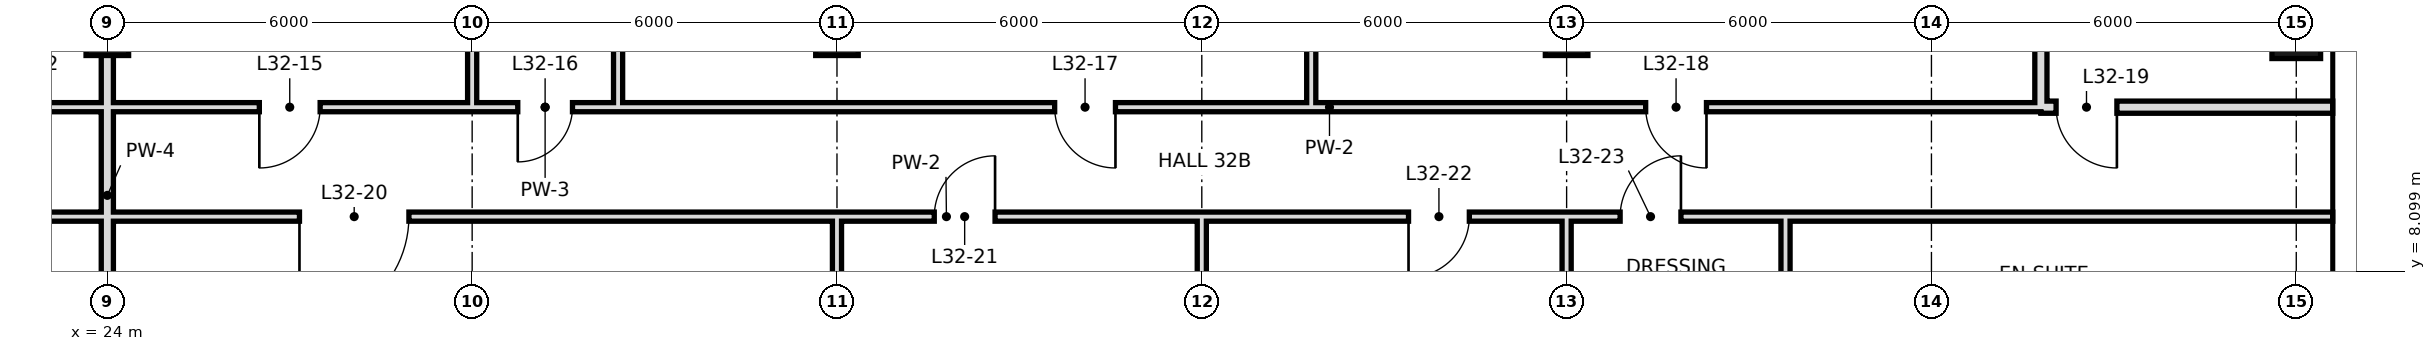
"""IFC4 building model, lengths in metres.
Left out: names, types, materials, properties, quantities, classifications, styles, units other than length and angle.
Written with IfcOpenShell. Run it as: python <this file> out.ifc"""

import sys

from ifc_helpers import new_model, si_unit, direction, frame, frame_2d, origin, origin_2d, place, context, subcontext, project, spatial, rectangle, hollow_rectangle, extrude, element, fill, save


model = new_model("IFC4")
c1 = context("Model", 3, precision=1e-05, world=origin(), true_north=direction((0.0, 1.0)))
c2 = subcontext(c1, "Body", "Model", "MODEL_VIEW")
j1 = project(units=[si_unit("LENGTHUNIT", "METRE"), si_unit("PLANEANGLEUNIT", "RADIAN")], contexts=[c1])
p1 = place(None, origin())
s1 = spatial("IfcSite", under=j1, at=p1, CompositionType="ELEMENT")
p2 = place(p1, origin())
s2 = spatial("IfcBuilding", under=s1, at=p2, CompositionType="ELEMENT")
p3 = place(p2, frame((0.0, 0.0, 143.8)))
s3 = spatial("IfcBuildingStorey", under=s2, at=p3, CompositionType="ELEMENT", Elevation=143.8)
for number, where, z_axis, x_axis in (
    (1, (24.0, 12.0, 0.0), (0.0, 0.0, 1.0), (1.0, 0.0, 0.0)),
    (2, (36.0, 12.0, 0.0), (0.0, 0.0, 1.0), (1.0, 0.0, 0.0)),
    (3, (48.0, 12.0, 0.0), (0.0, 0.0, 1.0), (1.0, 0.0, 0.0)),
):
    element("IfcColumn", number, at=place(p3, frame(where, z_axis=z_axis, x_axis=x_axis)), inside=s3, PredefinedType="COLUMN", context=c2, shape_type="SweptSolid", body=[
        extrude(hollow_rectangle(XDim=0.7, YDim=0.7, WallThickness=0.036, at=origin_2d()), origin(), (0.0, 0.0, 1.0), 3.6),
    ])
p4 = place(p3, frame((60.0, 12.0, 0.0), z_axis=(0.0, 0.0, 1.0), x_axis=(1.0, 0.0, 0.0)))
e4 = element("IfcColumn", 4, at=p4, inside=s3, PredefinedType="COLUMN", context=c2, shape_type="SweptSolid", body=[
    extrude(hollow_rectangle(XDim=0.8, YDim=0.8, WallThickness=0.04, at=origin_2d()), origin(), (0.0, 0.0, 1.0), 3.6),
])
p5 = place(p3, frame((24.0, 0.0, 0.0), z_axis=(0.0, 0.0, 1.0), x_axis=(0.0, 1.0, 0.0)))
e5 = element("IfcWall", 5, at=p5, inside=s3, PredefinedType="SOLIDWALL", context=c2, shape_type="SweptSolid", body=[
    extrude(rectangle(XDim=18.7, YDim=0.2, at=frame_2d((9.35, 0.0))), origin(), (0.0, 0.0, 1.0), 2.72),
])
p6 = place(p3, frame((30.0, 10.8, 0.0), z_axis=(0.0, 0.0, 1.0), x_axis=(0.0, 1.0, 0.0)))
e6 = element("IfcWall", 6, at=p6, inside=s3, PredefinedType="PARTITIONING", context=c2, shape_type="SweptSolid", body=[
    extrude(rectangle(XDim=7.9, YDim=0.15, at=frame_2d((3.95, 0.0))), origin(), (0.0, 0.0, 1.0), 2.72),
])
p7 = place(p3, frame((32.4, 10.8, 0.0), z_axis=(0.0, 0.0, 1.0), x_axis=(0.0, 1.0, 0.0)))
e7 = element("IfcWall", 7, at=p7, inside=s3, PredefinedType="PARTITIONING", context=c2, shape_type="SweptSolid", body=[
    extrude(rectangle(XDim=7.9, YDim=0.15, at=frame_2d((3.95, 0.0))), origin(), (0.0, 0.0, 1.0), 3.42),
])
p8 = place(p3, frame((36.0, 0.0, 0.0), z_axis=(0.0, 0.0, 1.0), x_axis=(0.0, 1.0, 0.0)))
e8 = element("IfcWall", 8, at=p8, inside=s3, PredefinedType="PARTITIONING", context=c2, shape_type="SweptSolid", body=[
    extrude(rectangle(XDim=9.0, YDim=0.15, at=frame_2d((4.5, 0.0))), origin(), (0.0, 0.0, 1.0), 2.72),
])
p9 = place(p3, frame((42.0, -0.6, 0.0), z_axis=(0.0, 0.0, 1.0), x_axis=(0.0, 1.0, 0.0)))
e9 = element("IfcWall", 9, at=p9, inside=s3, PredefinedType="PARTITIONING", context=c2, shape_type="SweptSolid", body=[
    extrude(rectangle(XDim=9.6, YDim=0.15, at=frame_2d((4.8, 0.0))), origin(), (0.0, 0.0, 1.0), 2.72),
])
p10 = place(p3, frame((43.8, 10.8, 0.0), z_axis=(0.0, 0.0, 1.0), x_axis=(0.0, 1.0, 0.0)))
e10 = element("IfcWall", 10, at=p10, inside=s3, PredefinedType="PARTITIONING", context=c2, shape_type="SweptSolid", body=[
    extrude(rectangle(XDim=7.9, YDim=0.15, at=frame_2d((3.95, 0.0))), origin(), (0.0, 0.0, 1.0), 3.42),
])
p11 = place(p3, frame((48.0, 0.0, 0.0), z_axis=(0.0, 0.0, 1.0), x_axis=(0.0, 1.0, 0.0)))
e11 = element("IfcWall", 11, at=p11, inside=s3, PredefinedType="PARTITIONING", context=c2, shape_type="SweptSolid", body=[
    extrude(rectangle(XDim=9.0, YDim=0.15, at=frame_2d((4.5, 0.0))), origin(), (0.0, 0.0, 1.0), 2.72),
])
p12 = place(p3, frame((51.6, 6.0, 0.0), z_axis=(0.0, 0.0, 1.0), x_axis=(0.0, 1.0, 0.0)))
e12 = element("IfcWall", 12, at=p12, inside=s3, PredefinedType="PARTITIONING", context=c2, shape_type="SweptSolid", body=[
    extrude(rectangle(XDim=3.0, YDim=0.15, at=frame_2d((1.5, 0.0))), origin(), (0.0, 0.0, 1.0), 3.42),
])
p13 = place(p3, frame((55.8, 10.8, 0.0), z_axis=(0.0, 0.0, 1.0), x_axis=(0.0, 1.0, 0.0)))
e13 = element("IfcWall", 13, at=p13, inside=s3, PredefinedType="SOLIDWALL", context=c2, shape_type="SweptSolid", body=[
    extrude(rectangle(XDim=7.2, YDim=0.2, at=frame_2d((3.6, 0.0))), origin(), (0.0, 0.0, 1.0), 2.72),
])
p14 = place(p3, frame((55.8, 10.8, 0.0), z_axis=(0.0, 0.0, 1.0), x_axis=(1.0, 0.0, 0.0)))
e14 = element("IfcWall", 14, at=p14, inside=s3, PredefinedType="SOLIDWALL", context=c2, shape_type="SweptSolid", body=[
    extrude(rectangle(XDim=4.8, YDim=0.2, at=frame_2d((2.4, 0.0))), origin(), (0.0, 0.0, 1.0), 2.97),
])
p15 = place(p14, frame((0.25, 0.0, 0.0)))
e15 = element("IfcOpeningElement", 15, at=p15, cuts=e14, PredefinedType="OPENING", context=c2, shape_type="SweptSolid", body=[
    extrude(rectangle(XDim=1.0, YDim=2.4, at=frame_2d((0.5, 1.2))), frame((0.0, 0.11, 0.0), z_axis=(0.0, -1.0, 0.0), x_axis=(1.0, 0.0, 0.0)), (0.0, 0.0, 1.0), 0.22),
])
p16 = place(p3, frame((15.6, 10.8, 0.0), z_axis=(0.0, 0.0, 1.0), x_axis=(1.0, 0.0, 0.0)))
e16 = element("IfcWall", 16, at=p16, inside=s3, PredefinedType="PARTITIONING", context=c2, shape_type="SweptSolid", body=[
    extrude(rectangle(XDim=14.4, YDim=0.15, at=frame_2d((7.2, 0.0))), origin(), (0.0, 0.0, 1.0), 3.42),
])
p17 = place(p16, frame((5.08, 0.0, 0.0)))
e17 = element("IfcOpeningElement", 17, at=p17, cuts=e16, PredefinedType="OPENING", context=c2, shape_type="SweptSolid", body=[
    extrude(rectangle(XDim=1.0, YDim=2.4, at=frame_2d((0.5, 1.2))), frame((0.0, 0.085, 0.0), z_axis=(0.0, -1.0, 0.0), x_axis=(1.0, 0.0, 0.0)), (0.0, 0.0, 1.0), 0.17),
])
p18 = place(p16, frame((10.9, 0.0, 0.0)))
e18 = element("IfcOpeningElement", 18, at=p18, cuts=e16, PredefinedType="OPENING", context=c2, shape_type="SweptSolid", body=[
    extrude(rectangle(XDim=1.0, YDim=2.4, at=frame_2d((0.5, 1.2))), frame((0.0, 0.085, 0.0), z_axis=(0.0, -1.0, 0.0), x_axis=(1.0, 0.0, 0.0)), (0.0, 0.0, 1.0), 0.17),
])
p19 = place(p3, frame((32.4, 10.8, 0.0), z_axis=(0.0, 0.0, 1.0), x_axis=(1.0, 0.0, 0.0)))
e19 = element("IfcWall", 19, at=p19, inside=s3, PredefinedType="PARTITIONING", context=c2, shape_type="SweptSolid", body=[
    extrude(rectangle(XDim=23.4, YDim=0.15, at=frame_2d((11.7, 0.0))), origin(), (0.0, 0.0, 1.0), 3.42),
])
p20 = place(p19, frame((7.18, 0.0, 0.0)))
e20 = element("IfcOpeningElement", 20, at=p20, cuts=e19, PredefinedType="OPENING", context=c2, shape_type="SweptSolid", body=[
    extrude(rectangle(XDim=1.0, YDim=2.4, at=frame_2d((0.5, 1.2))), frame((0.0, 0.085, 0.0), z_axis=(0.0, -1.0, 0.0), x_axis=(1.0, 0.0, 0.0)), (0.0, 0.0, 1.0), 0.17),
])
p21 = place(p19, frame((16.9, 0.0, 0.0)))
e21 = element("IfcOpeningElement", 21, at=p21, cuts=e19, PredefinedType="OPENING", context=c2, shape_type="SweptSolid", body=[
    extrude(rectangle(XDim=1.0, YDim=2.4, at=frame_2d((0.5, 1.2))), frame((0.0, 0.085, 0.0), z_axis=(0.0, -1.0, 0.0), x_axis=(1.0, 0.0, 0.0)), (0.0, 0.0, 1.0), 0.17),
])
p22 = place(p3, frame((30.0, 10.8, 0.0), z_axis=(0.0, 0.0, 1.0), x_axis=(1.0, 0.0, 0.0)))
e22 = element("IfcWall", 22, at=p22, inside=s3, PredefinedType="PARTITIONING", context=c2, shape_type="SweptSolid", body=[
    extrude(rectangle(XDim=2.4, YDim=0.15, at=frame_2d((1.2, 0.0))), origin(), (0.0, 0.0, 1.0), 3.42),
])
p23 = place(p22, frame((0.75, 0.0, 0.0)))
e23 = element("IfcOpeningElement", 23, at=p23, cuts=e22, PredefinedType="OPENING", context=c2, shape_type="SweptSolid", body=[
    extrude(rectangle(XDim=0.9, YDim=2.4, at=frame_2d((0.45, 1.2))), frame((0.0, 0.085, 0.0), z_axis=(0.0, -1.0, 0.0), x_axis=(1.0, 0.0, 0.0)), (0.0, 0.0, 1.0), 0.17),
])
p24 = place(p3, frame((24.0, 9.0, 0.0), z_axis=(0.0, 0.0, 1.0), x_axis=(1.0, 0.0, 0.0)))
e24 = element("IfcWall", 24, at=p24, inside=s3, PredefinedType="PARTITIONING", context=c2, shape_type="SweptSolid", body=[
    extrude(rectangle(XDim=27.6, YDim=0.15, at=frame_2d((13.8, 0.0))), origin(), (0.0, 0.0, 1.0), 3.42),
])
p25 = place(p24, frame((3.16, 0.0, 0.0)))
e25 = element("IfcOpeningElement", 25, at=p25, cuts=e24, PredefinedType="OPENING", context=c2, shape_type="SweptSolid", body=[
    extrude(rectangle(XDim=1.8, YDim=2.4, at=frame_2d((0.9, 1.2))), frame((0.0, 0.085, 0.0), z_axis=(0.0, -1.0, 0.0), x_axis=(1.0, 0.0, 0.0)), (0.0, 0.0, 1.0), 0.17),
])
p26 = place(p24, frame((13.6, 0.0, 0.0)))
e26 = element("IfcOpeningElement", 26, at=p26, cuts=e24, PredefinedType="OPENING", context=c2, shape_type="SweptSolid", body=[
    extrude(rectangle(XDim=1.0, YDim=2.4, at=frame_2d((0.5, 1.2))), frame((0.0, 0.085, 0.0), z_axis=(0.0, -1.0, 0.0), x_axis=(1.0, 0.0, 0.0)), (0.0, 0.0, 1.0), 0.17),
])
p27 = place(p24, frame((21.4, 0.0, 0.0)))
e27 = element("IfcOpeningElement", 27, at=p27, cuts=e24, PredefinedType="OPENING", context=c2, shape_type="SweptSolid", body=[
    extrude(rectangle(XDim=1.0, YDim=2.4, at=frame_2d((0.5, 1.2))), frame((0.0, 0.085, 0.0), z_axis=(0.0, -1.0, 0.0), x_axis=(1.0, 0.0, 0.0)), (0.0, 0.0, 1.0), 0.17),
])
p28 = place(p24, frame((24.88, 0.0, 0.0)))
e28 = element("IfcOpeningElement", 28, at=p28, cuts=e24, PredefinedType="OPENING", context=c2, shape_type="SweptSolid", body=[
    extrude(rectangle(XDim=1.0, YDim=2.4, at=frame_2d((0.5, 1.2))), frame((0.0, 0.085, 0.0), z_axis=(0.0, -1.0, 0.0), x_axis=(1.0, 0.0, 0.0)), (0.0, 0.0, 1.0), 0.17),
])
p29 = place(p3, frame((21.6, 9.0, 0.0), z_axis=(0.0, 0.0, 1.0), x_axis=(1.0, 0.0, 0.0)))
e29 = element("IfcWall", 29, at=p29, inside=s3, PredefinedType="PARTITIONING", context=c2, shape_type="SweptSolid", body=[
    extrude(rectangle(XDim=2.4, YDim=0.15, at=frame_2d((1.2, 0.0))), origin(), (0.0, 0.0, 1.0), 3.42),
])
p30 = place(p3, frame((51.6, 9.0, 0.0), z_axis=(0.0, 0.0, 1.0), x_axis=(1.0, 0.0, 0.0)))
e30 = element("IfcWall", 30, at=p30, inside=s3, PredefinedType="PARTITIONING", context=c2, shape_type="SweptSolid", body=[
    extrude(rectangle(XDim=9.0, YDim=0.15, at=frame_2d((4.5, 0.0))), origin(), (0.0, 0.0, 1.0), 3.42),
])
p31 = place(p18, frame((1.0, 0.0, 0.0), z_axis=(0.0, 0.0, 1.0), x_axis=(-1.0, 0.0, 0.0)))
e31 = element("IfcDoor", 31, at=p31, inside=s3, OperationType="SINGLE_SWING_RIGHT", PredefinedType="DOOR", context=c2, shape_type="SweptSolid", body=[
    extrude(rectangle(XDim=1.0, YDim=2.4, at=frame_2d((0.5, 1.2))), frame((0.0, 0.025, 0.0), z_axis=(0.0, -1.0, 0.0), x_axis=(1.0, 0.0, 0.0)), (0.0, 0.0, 1.0), 0.05),
])
fill(e18, e31)
p32 = place(p23, frame((0.9, 0.0, 0.0), z_axis=(0.0, 0.0, 1.0), x_axis=(-1.0, 0.0, 0.0)))
e32 = element("IfcDoor", 32, at=p32, inside=s3, OperationType="SINGLE_SWING_RIGHT", PredefinedType="DOOR", context=c2, shape_type="SweptSolid", body=[
    extrude(rectangle(XDim=0.9, YDim=2.4, at=frame_2d((0.45, 1.2))), frame((0.0, 0.025, 0.0), z_axis=(0.0, -1.0, 0.0), x_axis=(1.0, 0.0, 0.0)), (0.0, 0.0, 1.0), 0.05),
])
fill(e23, e32)
p33 = place(p20, origin())
e33 = element("IfcDoor", 33, at=p33, inside=s3, OperationType="SINGLE_SWING_RIGHT", PredefinedType="DOOR", context=c2, shape_type="SweptSolid", body=[
    extrude(rectangle(XDim=1.0, YDim=2.4, at=frame_2d((0.5, 1.2))), frame((0.0, 0.025, 0.0), z_axis=(0.0, -1.0, 0.0), x_axis=(1.0, 0.0, 0.0)), (0.0, 0.0, 1.0), 0.05),
])
fill(e20, e33)
p34 = place(p21, origin())
e34 = element("IfcDoor", 34, at=p34, inside=s3, OperationType="SINGLE_SWING_RIGHT", PredefinedType="DOOR", context=c2, shape_type="SweptSolid", body=[
    extrude(rectangle(XDim=1.0, YDim=2.4, at=frame_2d((0.5, 1.2))), frame((0.0, 0.025, 0.0), z_axis=(0.0, -1.0, 0.0), x_axis=(1.0, 0.0, 0.0)), (0.0, 0.0, 1.0), 0.05),
])
fill(e21, e34)
p35 = place(p15, origin())
e35 = element("IfcDoor", 35, at=p35, inside=s3, OperationType="SINGLE_SWING_RIGHT", PredefinedType="DOOR", context=c2, shape_type="SweptSolid", body=[
    extrude(rectangle(XDim=1.0, YDim=2.4, at=frame_2d((0.5, 1.2))), frame((0.0, 0.025, 0.0), z_axis=(0.0, -1.0, 0.0), x_axis=(1.0, 0.0, 0.0)), (0.0, 0.0, 1.0), 0.05),
])
fill(e15, e35)
p36 = place(p25, frame((1.8, 0.0, 0.0), z_axis=(0.0, 0.0, 1.0), x_axis=(-1.0, 0.0, 0.0)))
e36 = element("IfcDoor", 36, at=p36, inside=s3, OperationType="SINGLE_SWING_RIGHT", PredefinedType="DOOR", context=c2, shape_type="SweptSolid", body=[
    extrude(rectangle(XDim=1.8, YDim=2.4, at=frame_2d((0.9, 1.2))), frame((0.0, 0.025, 0.0), z_axis=(0.0, -1.0, 0.0), x_axis=(1.0, 0.0, 0.0)), (0.0, 0.0, 1.0), 0.05),
])
fill(e25, e36)
p37 = place(p26, frame((1.0, 0.0, 0.0), z_axis=(0.0, 0.0, 1.0), x_axis=(-1.0, 0.0, 0.0)))
e37 = element("IfcDoor", 37, at=p37, inside=s3, OperationType="SINGLE_SWING_LEFT", PredefinedType="DOOR", context=c2, shape_type="SweptSolid", body=[
    extrude(rectangle(XDim=1.0, YDim=2.4, at=frame_2d((0.5, 1.2))), frame((0.0, 0.025, 0.0), z_axis=(0.0, -1.0, 0.0), x_axis=(1.0, 0.0, 0.0)), (0.0, 0.0, 1.0), 0.05),
])
fill(e26, e37)
p38 = place(p27, frame((1.0, 0.0, 0.0), z_axis=(0.0, 0.0, 1.0), x_axis=(-1.0, 0.0, 0.0)))
e38 = element("IfcDoor", 38, at=p38, inside=s3, OperationType="SINGLE_SWING_RIGHT", PredefinedType="DOOR", context=c2, shape_type="SweptSolid", body=[
    extrude(rectangle(XDim=1.0, YDim=2.4, at=frame_2d((0.5, 1.2))), frame((0.0, 0.025, 0.0), z_axis=(0.0, -1.0, 0.0), x_axis=(1.0, 0.0, 0.0)), (0.0, 0.0, 1.0), 0.05),
])
fill(e27, e38)
p39 = place(p28, frame((1.0, 0.0, 0.0), z_axis=(0.0, 0.0, 1.0), x_axis=(-1.0, 0.0, 0.0)))
e39 = element("IfcDoor", 39, at=p39, inside=s3, OperationType="SINGLE_SWING_LEFT", PredefinedType="DOOR", context=c2, shape_type="SweptSolid", body=[
    extrude(rectangle(XDim=1.0, YDim=2.4, at=frame_2d((0.5, 1.2))), frame((0.0, 0.025, 0.0), z_axis=(0.0, -1.0, 0.0), x_axis=(1.0, 0.0, 0.0)), (0.0, 0.0, 1.0), 0.05),
])
fill(e28, e39)
save(model, sys.argv[1])
